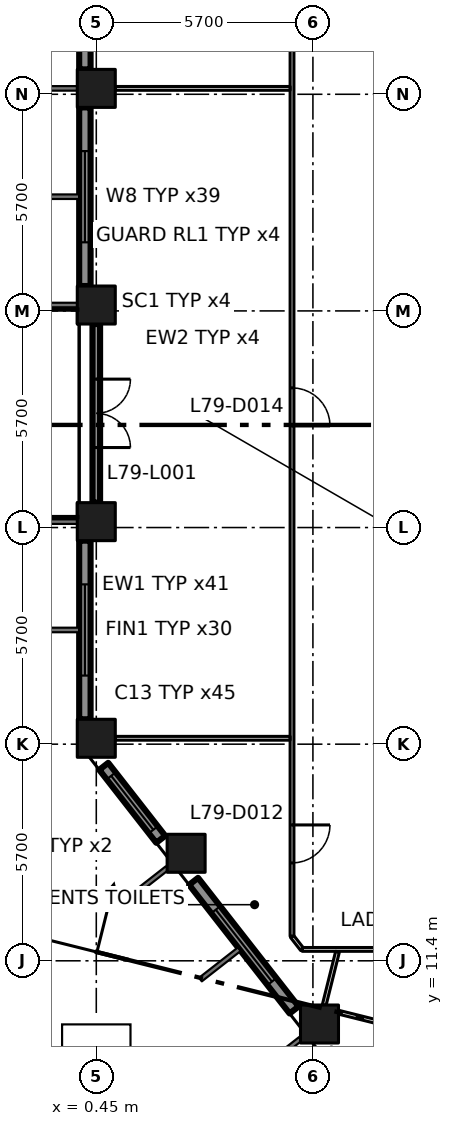
"""IFC4 building model, lengths in metres.
Left out: names, types, materials, properties, quantities, classifications, styles, units other than length and angle.
Written with IfcOpenShell. Run it as: python <this file> out.ifc"""

import sys

from ifc_helpers import new_model, si_unit, direction, frame, frame_2d, origin, origin_2d, place, context, subcontext, project, spatial, rectangle, extrude, element, fill, save


model = new_model("IFC4")
c1 = context("Model", 3, precision=1e-05, world=origin(), true_north=direction((0.0, 1.0)))
c2 = subcontext(c1, "Body", "Model", "MODEL_VIEW")
j1 = project(units=[si_unit("LENGTHUNIT", "METRE"), si_unit("PLANEANGLEUNIT", "RADIAN")], contexts=[c1])
p1 = place(None, origin())
s1 = spatial("IfcSite", under=j1, at=p1, CompositionType="ELEMENT")
p2 = place(p1, origin())
s2 = spatial("IfcBuilding", under=s1, at=p2, CompositionType="ELEMENT")
p3 = place(p2, frame((0.0, 0.0, 344.4)))
s3 = spatial("IfcBuildingStorey", under=s2, at=p3, CompositionType="ELEMENT", Elevation=344.4)
for number, where, z_axis, x_axis in (
    (1, (0.45, 17.255, 0.0), (0.0, 0.0, 1.0), (1.0, 0.0, 0.0)),
    (2, (0.45, 22.955, 0.0), (0.0, 0.0, 1.0), (1.0, 0.0, 0.0)),
    (3, (0.45, 28.655, 0.0), (0.0, 0.0, 1.0), (1.0, 0.0, 0.0)),
    (4, (0.45, 34.355, 0.0), (0.0, 0.0, 1.0), (1.0, 0.0, 0.0)),
    (5, (6.323, 9.737, 0.0), (0.0, 0.0, 1.0), (1.0, 0.0, 0.0)),
    (6, (2.814, 14.229, 0.0), (0.0, 0.0, 1.0), (1.0, 0.0, 0.0)),
):
    element("IfcColumn", number, at=place(p3, frame(where, z_axis=z_axis, x_axis=x_axis)), inside=s3, PredefinedType="COLUMN", context=c2, shape_type="SweptSolid", body=[
        extrude(rectangle(XDim=1.0, YDim=1.0, at=origin_2d()), origin(), (0.0, 0.0, 1.0), 4.2),
    ])
p4 = place(p3, frame((0.15, 39.555, 0.0), z_axis=(0.0, 0.0, 1.0), x_axis=(0.0, -1.0, 0.0)))
e7 = element("IfcWall", 7, at=p4, inside=s3, PredefinedType="SOLIDWALL", context=c2, shape_type="SweptSolid", body=[
    extrude(rectangle(XDim=4.7, YDim=0.3, at=frame_2d((2.35, 0.0))), origin(), (0.0, 0.0, 1.0), 3.05),
])
p5 = place(p4, frame((1.15, 0.0, 0.8)))
e8 = element("IfcOpeningElement", 8, at=p5, cuts=e7, PredefinedType="OPENING", context=c2, shape_type="SweptSolid", body=[
    extrude(rectangle(XDim=2.4, YDim=1.45, at=frame_2d((1.2, 0.725))), frame((0.0, 0.16, 0.0), z_axis=(0.0, -1.0, 0.0), x_axis=(1.0, 0.0, 0.0)), (0.0, 0.0, 1.0), 0.32),
])
p6 = place(p3, frame((0.15, 33.855, 0.0), z_axis=(0.0, 0.0, 1.0), x_axis=(0.0, -1.0, 0.0)))
e9 = element("IfcWall", 9, at=p6, inside=s3, PredefinedType="SOLIDWALL", context=c2, shape_type="SweptSolid", body=[
    extrude(rectangle(XDim=4.7, YDim=0.3, at=frame_2d((2.35, 0.0))), origin(), (0.0, 0.0, 1.0), 3.05),
])
p7 = place(p6, frame((1.15, 0.0, 0.8)))
e10 = element("IfcOpeningElement", 10, at=p7, cuts=e9, PredefinedType="OPENING", context=c2, shape_type="SweptSolid", body=[
    extrude(rectangle(XDim=2.4, YDim=1.45, at=frame_2d((1.2, 0.725))), frame((0.0, 0.16, 0.0), z_axis=(0.0, -1.0, 0.0), x_axis=(1.0, 0.0, 0.0)), (0.0, 0.0, 1.0), 0.32),
])
p8 = place(p3, frame((0.45, 28.155, 0.0), z_axis=(0.0, 0.0, 1.0), x_axis=(0.0, -1.0, 0.0)))
e11 = element("IfcWall", 11, at=p8, inside=s3, PredefinedType="SOLIDWALL", context=c2, shape_type="SweptSolid", body=[
    extrude(rectangle(XDim=4.699, YDim=0.2, at=frame_2d((2.35, 0.0))), origin(), (0.0, 0.0, 1.0), 3.05),
])
p9 = place(p8, frame((1.45, 0.0, 0.0)))
e12 = element("IfcOpeningElement", 12, at=p9, cuts=e11, PredefinedType="OPENING", context=c2, shape_type="SweptSolid", body=[
    extrude(rectangle(XDim=1.8, YDim=2.9, at=frame_2d((0.9, 1.45))), frame((0.0, 0.11, 0.0), z_axis=(0.0, -1.0, 0.0), x_axis=(1.0, 0.0, 0.0)), (0.0, 0.0, 1.0), 0.22),
])
p10 = place(p3, frame((0.15, 22.455, 0.0), z_axis=(0.0, 0.0, 1.0), x_axis=(0.0, -1.0, 0.0)))
e13 = element("IfcWall", 13, at=p10, inside=s3, PredefinedType="SOLIDWALL", context=c2, shape_type="SweptSolid", body=[
    extrude(rectangle(XDim=4.7, YDim=0.3, at=frame_2d((2.35, 0.0))), origin(), (0.0, 0.0, 1.0), 3.05),
])
p11 = place(p10, frame((1.15, 0.0, 0.8)))
e14 = element("IfcOpeningElement", 14, at=p11, cuts=e13, PredefinedType="OPENING", context=c2, shape_type="SweptSolid", body=[
    extrude(rectangle(XDim=2.4, YDim=1.45, at=frame_2d((1.2, 0.725))), frame((0.0, 0.16, 0.0), z_axis=(0.0, -1.0, 0.0), x_axis=(1.0, 0.0, 0.0)), (0.0, 0.0, 1.0), 0.32),
])
p12 = place(p3, frame((0.646, 16.517, 0.0), z_axis=(0.0, 0.0, 1.0), x_axis=(0.615610986717, -0.788050197026, 0.0)))
e15 = element("IfcWall", 15, at=p12, inside=s3, PredefinedType="SOLIDWALL", context=c2, shape_type="SweptSolid", body=[
    extrude(rectangle(XDim=2.437, YDim=0.3, at=frame_2d((1.218, 0.0))), origin(), (0.0, 0.0, 1.0), 3.05),
])
p13 = place(p12, frame((0.318, 0.0, 0.8)))
e16 = element("IfcOpeningElement", 16, at=p13, cuts=e15, PredefinedType="OPENING", context=c2, shape_type="SweptSolid", body=[
    extrude(rectangle(XDim=1.8, YDim=1.45, at=frame_2d((0.9, 0.725))), frame((0.0, 0.16, 0.0), z_axis=(0.0, -1.0, 0.0), x_axis=(1.0, 0.0, 0.0)), (0.0, 0.0, 1.0), 0.32),
])
p14 = place(p3, frame((3.01, 13.491, 0.0), z_axis=(0.0, 0.0, 1.0), x_axis=(0.615713519567, -0.787970089421, 0.0)))
e17 = element("IfcWall", 17, at=p14, inside=s3, PredefinedType="SOLIDWALL", context=c2, shape_type="SweptSolid", body=[
    extrude(rectangle(XDim=4.296, YDim=0.3, at=frame_2d((2.148, 0.0))), origin(), (0.0, 0.0, 1.0), 3.05),
])
p15 = place(p14, frame((0.948, 0.0, 0.8)))
e18 = element("IfcOpeningElement", 18, at=p15, cuts=e17, PredefinedType="OPENING", context=c2, shape_type="SweptSolid", body=[
    extrude(rectangle(XDim=2.4, YDim=1.45, at=frame_2d((1.2, 0.725))), frame((0.0, 0.16, 0.0), z_axis=(0.0, -1.0, 0.0), x_axis=(1.0, 0.0, 0.0)), (0.0, 0.0, 1.0), 0.32),
])
p16 = place(p3, frame((5.6, 12.044, 0.0), z_axis=(0.0, 0.0, 1.0), x_axis=(0.614328236968, -0.789050579661, 0.0)))
e19 = element("IfcWall", 19, at=p16, inside=s3, PredefinedType="PARTITIONING", context=c2, shape_type="SweptSolid", body=[
    extrude(rectangle(XDim=0.436, YDim=0.1, at=frame_2d((0.218, 0.0))), origin(), (0.0, 0.0, 1.0), 3.75),
])
p17 = place(p3, frame((5.6, 39.3, 0.0), z_axis=(0.0, 0.0, 1.0), x_axis=(0.0, -1.0, 0.0)))
e20 = element("IfcWall", 20, at=p17, inside=s3, PredefinedType="PARTITIONING", context=c2, shape_type="SweptSolid", body=[
    extrude(rectangle(XDim=27.256, YDim=0.1, at=frame_2d((13.628, 0.0))), origin(), (0.0, 0.0, 1.0), 3.75),
])
p18 = place(p17, frame((24.325, 0.0, 0.0)))
e21 = element("IfcOpeningElement", 21, at=p18, cuts=e20, PredefinedType="OPENING", context=c2, shape_type="SweptSolid", body=[
    extrude(rectangle(XDim=1.0, YDim=2.1, at=frame_2d((0.5, 1.05))), frame((0.0, 0.06, 0.0), z_axis=(0.0, -1.0, 0.0), x_axis=(1.0, 0.0, 0.0)), (0.0, 0.0, 1.0), 0.12),
])
p19 = place(p17, frame((12.825, 0.0, 0.0)))
e22 = element("IfcOpeningElement", 22, at=p19, cuts=e20, PredefinedType="OPENING", context=c2, shape_type="SweptSolid", body=[
    extrude(rectangle(XDim=1.0, YDim=2.1, at=frame_2d((0.5, 1.05))), frame((0.0, 0.06, 0.0), z_axis=(0.0, -1.0, 0.0), x_axis=(1.0, 0.0, 0.0)), (0.0, 0.0, 1.0), 0.12),
])
p20 = place(p3, frame((5.868, 11.7, 0.0), z_axis=(0.0, 0.0, 1.0), x_axis=(1.0, 0.0, 0.0)))
e23 = element("IfcWall", 23, at=p20, inside=s3, PredefinedType="PARTITIONING", context=c2, shape_type="SweptSolid", body=[
    extrude(rectangle(XDim=4.032, YDim=0.1, at=frame_2d((2.016, 0.0))), origin(), (0.0, 0.0, 1.0), 3.75),
])
for number, where, z_axis, x_axis in (
    (24, (5.55, 17.255, 0.0), (0.0, 0.0, 1.0), (-1.0, 0.0, 0.0)),
    (25, (5.55, 34.355, 0.0), (0.0, 0.0, 1.0), (-1.0, 0.0, 0.0)),
):
    element("IfcWall", number, at=place(p3, frame(where, z_axis=z_axis, x_axis=x_axis)), inside=s3, PredefinedType="PARTITIONING", context=c2, shape_type="SweptSolid", body=[
        extrude(rectangle(XDim=4.6, YDim=0.1, at=frame_2d((2.3, 0.0))), origin(), (0.0, 0.0, 1.0), 3.75),
    ])
p21 = place(p3, frame((6.797, 11.638, 0.0), z_axis=(0.0, 0.0, 1.0), x_axis=(-0.242456058691, -0.970162388265, 0.0)))
e26 = element("IfcWall", 26, at=p21, inside=s3, PredefinedType="PARTITIONING", context=c2, shape_type="SweptSolid", body=[
    extrude(rectangle(XDim=1.444, YDim=0.1, at=frame_2d((0.722, 0.0))), origin(), (0.0, 0.0, 1.0), 3.75),
])
p22 = place(p3, frame((8.72, 9.575, 0.0), z_axis=(0.0, 0.0, 1.0), x_axis=(-0.970274576003, 0.242006708918, 0.0)))
e27 = element("IfcWall", 27, at=p22, inside=s3, PredefinedType="PARTITIONING", context=c2, shape_type="SweptSolid", body=[
    extrude(rectangle(XDim=1.955, YDim=0.1, at=frame_2d((0.978, 0.0))), origin(), (0.0, 0.0, 1.0), 3.75),
])
p23 = place(p7, origin())
e28 = element("IfcWindow", 28, at=p23, inside=s3, PartitioningType="DOUBLE_PANEL_VERTICAL", PredefinedType="WINDOW", context=c2, shape_type="SweptSolid", body=[
    extrude(rectangle(XDim=2.4, YDim=1.45, at=frame_2d((1.2, 0.725))), frame((0.0, 0.03, 0.0), z_axis=(0.0, -1.0, 0.0), x_axis=(1.0, 0.0, 0.0)), (0.0, 0.0, 1.0), 0.06),
])
fill(e10, e28)
p24 = place(p9, origin())
e29 = element("IfcDoor", 29, at=p24, inside=s3, OperationType="DOUBLE_DOOR_SINGLE_SWING", PredefinedType="DOOR", context=c2, shape_type="SweptSolid", body=[
    extrude(rectangle(XDim=1.8, YDim=2.9, at=frame_2d((0.9, 1.45))), frame((0.0, 0.025, 0.0), z_axis=(0.0, -1.0, 0.0), x_axis=(1.0, 0.0, 0.0)), (0.0, 0.0, 1.0), 0.05),
])
fill(e12, e29)
p25 = place(p11, origin())
e30 = element("IfcWindow", 30, at=p25, inside=s3, PartitioningType="DOUBLE_PANEL_VERTICAL", PredefinedType="WINDOW", context=c2, shape_type="SweptSolid", body=[
    extrude(rectangle(XDim=2.4, YDim=1.45, at=frame_2d((1.2, 0.725))), frame((0.0, 0.03, 0.0), z_axis=(0.0, -1.0, 0.0), x_axis=(1.0, 0.0, 0.0)), (0.0, 0.0, 1.0), 0.06),
])
fill(e14, e30)
p26 = place(p13, origin())
e31 = element("IfcWindow", 31, at=p26, inside=s3, PartitioningType="DOUBLE_PANEL_VERTICAL", PredefinedType="WINDOW", context=c2, shape_type="SweptSolid", body=[
    extrude(rectangle(XDim=1.8, YDim=1.45, at=frame_2d((0.9, 0.725))), frame((0.0, 0.03, 0.0), z_axis=(0.0, -1.0, 0.0), x_axis=(1.0, 0.0, 0.0)), (0.0, 0.0, 1.0), 0.06),
])
fill(e16, e31)
p27 = place(p15, origin())
e32 = element("IfcWindow", 32, at=p27, inside=s3, PartitioningType="DOUBLE_PANEL_VERTICAL", PredefinedType="WINDOW", context=c2, shape_type="SweptSolid", body=[
    extrude(rectangle(XDim=2.4, YDim=1.45, at=frame_2d((1.2, 0.725))), frame((0.0, 0.03, 0.0), z_axis=(0.0, -1.0, 0.0), x_axis=(1.0, 0.0, 0.0)), (0.0, 0.0, 1.0), 0.06),
])
fill(e18, e32)
p28 = place(p18, origin())
e33 = element("IfcDoor", 33, at=p28, inside=s3, OperationType="SINGLE_SWING_LEFT", PredefinedType="DOOR", context=c2, shape_type="SweptSolid", body=[
    extrude(rectangle(XDim=1.0, YDim=2.1, at=frame_2d((0.5, 1.05))), frame((0.0, 0.025, 0.0), z_axis=(0.0, -1.0, 0.0), x_axis=(1.0, 0.0, 0.0)), (0.0, 0.0, 1.0), 0.05),
])
fill(e21, e33)
p29 = place(p19, origin())
e34 = element("IfcDoor", 34, at=p29, inside=s3, OperationType="SINGLE_SWING_RIGHT", PredefinedType="DOOR", context=c2, shape_type="SweptSolid", body=[
    extrude(rectangle(XDim=1.0, YDim=2.1, at=frame_2d((0.5, 1.05))), frame((0.0, 0.025, 0.0), z_axis=(0.0, -1.0, 0.0), x_axis=(1.0, 0.0, 0.0)), (0.0, 0.0, 1.0), 0.05),
])
fill(e22, e34)
save(model, sys.argv[1])
